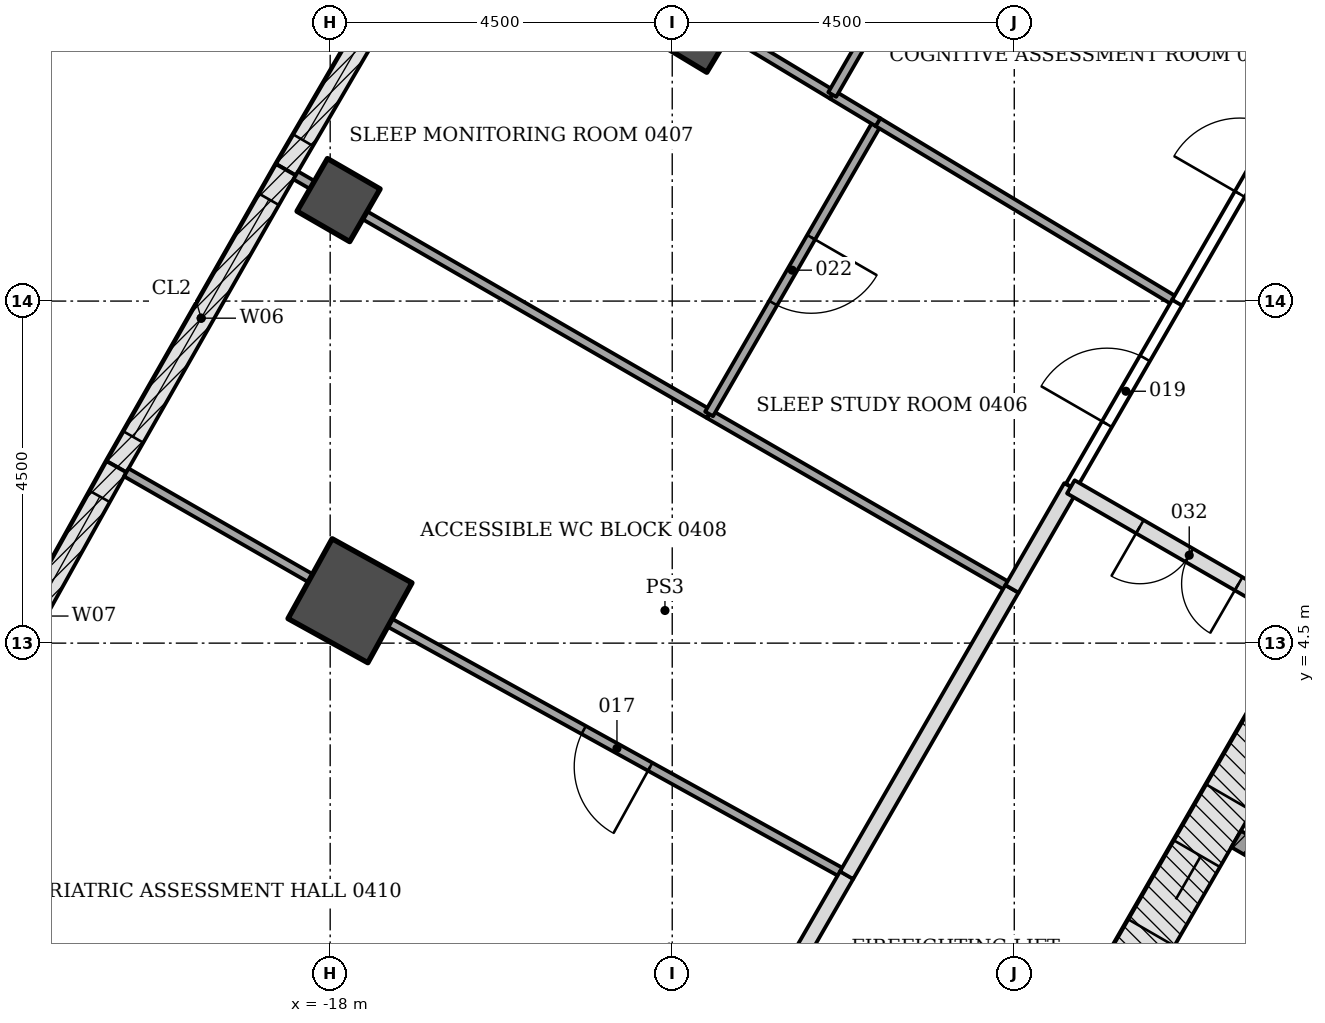
"""IFC4 building model, lengths in metres.
Left out: names, types, materials, properties, quantities, classifications, styles, units other than length and angle.
Written with IfcOpenShell. Run it as: python <this file> out.ifc"""

import sys

from ifc_helpers import new_model, si_unit, direction, frame, frame_2d, origin, origin_2d, place, context, subcontext, project, spatial, rectangle, extrude, element, fill, save


model = new_model("IFC4")
c1 = context("Model", 3, precision=1e-05, world=origin(), true_north=direction((0.0, 1.0)))
c2 = subcontext(c1, "Body", "Model", "MODEL_VIEW")
j1 = project(units=[si_unit("LENGTHUNIT", "METRE"), si_unit("PLANEANGLEUNIT", "RADIAN")], contexts=[c1])
p1 = place(None, origin())
s1 = spatial("IfcSite", under=j1, at=p1, CompositionType="ELEMENT")
p2 = place(p1, origin())
s2 = spatial("IfcBuilding", under=s1, at=p2, CompositionType="ELEMENT")
p3 = place(p2, frame((0.0, 0.0, 19.5)))
s3 = spatial("IfcBuildingStorey", under=s2, at=p3, CompositionType="ELEMENT", Elevation=19.5)
for number, where, z_axis, x_axis in (
    (1, (-13.25, 12.834, -0.25), (0.0, 0.0, 1.0), (-0.857, 0.516, 0.0)),
    (2, (-17.739, 5.058, -0.25), (0.0, 0.0, 1.0), (-0.875, 0.484, 0.0)),
):
    element("IfcColumn", number, at=place(p3, frame(where, z_axis=z_axis, x_axis=x_axis)), inside=s3, PredefinedType="COLUMN", context=c2, shape_type="SweptSolid", body=[
        extrude(rectangle(XDim=1.2, YDim=1.2, at=origin_2d()), origin(), (0.0, 0.0, 1.0), 4.55),
    ])
p4 = place(p3, frame((-17.89, 10.329, -0.25), z_axis=(0.0, 0.0, 1.0), x_axis=(-0.866025403784, 0.5, 0.0)))
e3 = element("IfcColumn", 3, at=p4, inside=s3, PredefinedType="COLUMN", context=c2, shape_type="SweptSolid", body=[
    extrude(rectangle(XDim=0.8, YDim=0.8, at=origin_2d()), origin(), (0.0, 0.0, 1.0), 4.55),
])
p5 = place(p3, frame((-1.083, 11.281, -0.25), z_axis=(0.0, 0.0, 1.0), x_axis=(-0.500001446645, -0.866024568562, 0.0)))
e4 = element("IfcWall", 4, at=p5, inside=s3, PredefinedType="SHEAR", context=c2, shape_type="SweptSolid", body=[
    extrude(rectangle(XDim=18.458, YDim=0.7, at=frame_2d((9.229, 0.0))), origin(), (0.0, 0.0, 1.0), 4.55),
])
p6 = place(p5, frame((8.979, 0.0, 0.25)))
e5 = element("IfcOpeningElement", 5, at=p6, cuts=e4, PredefinedType="OPENING", context=c2, shape_type="SweptSolid", body=[
    extrude(rectangle(XDim=1.2, YDim=2.1, at=frame_2d((0.6, 1.05))), frame((0.0, 0.36, 0.0), z_axis=(0.0, -1.0, 0.0), x_axis=(1.0, 0.0, 0.0)), (0.0, 0.0, 1.0), 0.72),
])
p7 = place(p5, frame((11.029, 0.0, 0.25)))
e6 = element("IfcOpeningElement", 6, at=p7, cuts=e4, PredefinedType="OPENING", context=c2, shape_type="SweptSolid", body=[
    extrude(rectangle(XDim=1.2, YDim=2.1, at=frame_2d((0.6, 1.05))), frame((0.0, 0.36, 0.0), z_axis=(0.0, -1.0, 0.0), x_axis=(1.0, 0.0, 0.0)), (0.0, 0.0, 1.0), 0.72),
])
p8 = place(p3, frame((-18.582, 10.73, 0.0), z_axis=(0.0, 0.0, 1.0), x_axis=(0.50445499627, 0.86343798662, 0.0)))
e7 = element("IfcWall", 7, at=p8, inside=s3, PredefinedType="NOTDEFINED", context=c2, shape_type="SweptSolid", body=[
    extrude(rectangle(XDim=4.496, YDim=0.3, at=frame_2d((2.248, 0.0))), origin(), (0.0, 0.0, 1.0), 4.3),
])
p9 = place(p8, frame((0.448, 0.0, 1.5)))
e8 = element("IfcOpeningElement", 8, at=p9, cuts=e7, PredefinedType="OPENING", context=c2, shape_type="SweptSolid", body=[
    extrude(rectangle(XDim=3.6, YDim=1.8, at=frame_2d((1.8, 0.9))), frame((0.0, 0.16, 0.0), z_axis=(0.0, -1.0, 0.0), x_axis=(1.0, 0.0, 0.0)), (0.0, 0.0, 1.0), 0.32),
])
p10 = place(p3, frame((-20.811, 6.823, 0.0), z_axis=(0.0, 0.0, 1.0), x_axis=(0.495524760411, 0.868593812907, 0.0)))
e9 = element("IfcWall", 9, at=p10, inside=s3, PredefinedType="NOTDEFINED", context=c2, shape_type="SweptSolid", body=[
    extrude(rectangle(XDim=4.496, YDim=0.3, at=frame_2d((2.248, 0.0))), origin(), (0.0, 0.0, 1.0), 4.3),
])
p11 = place(p10, frame((0.448, 0.0, 1.5)))
e10 = element("IfcOpeningElement", 10, at=p11, cuts=e9, PredefinedType="OPENING", context=c2, shape_type="SweptSolid", body=[
    extrude(rectangle(XDim=3.6, YDim=1.8, at=frame_2d((1.8, 0.9))), frame((0.0, 0.16, 0.0), z_axis=(0.0, -1.0, 0.0), x_axis=(1.0, 0.0, 0.0)), (0.0, 0.0, 1.0), 0.32),
])
p12 = place(p3, frame((-23.0, 2.893, 0.0), z_axis=(0.0, 0.0, 1.0), x_axis=(0.486606252415, 0.873621402617, 0.0)))
e11 = element("IfcWall", 11, at=p12, inside=s3, PredefinedType="NOTDEFINED", context=c2, shape_type="SweptSolid", body=[
    extrude(rectangle(XDim=4.496, YDim=0.3, at=frame_2d((2.248, 0.0))), origin(), (0.0, 0.0, 1.0), 4.3),
])
p13 = place(p12, frame((0.448, 0.0, 1.5)))
e12 = element("IfcOpeningElement", 12, at=p13, cuts=e11, PredefinedType="OPENING", context=c2, shape_type="SweptSolid", body=[
    extrude(rectangle(XDim=3.6, YDim=1.8, at=frame_2d((1.8, 0.9))), frame((0.0, 0.16, 0.0), z_axis=(0.0, -1.0, 0.0), x_axis=(1.0, 0.0, 0.0)), (0.0, 0.0, 1.0), 0.32),
])
p14 = place(p3, frame((-6.081, 1.923, -0.25), z_axis=(0.0, 0.0, 1.0), x_axis=(0.866032775405, -0.499987231761, 0.0)))
e13 = element("IfcWall", 13, at=p14, inside=s3, PredefinedType="PARTITIONING", context=c2, shape_type="SweptSolid", body=[
    extrude(rectangle(XDim=2.9, YDim=0.25, at=frame_2d((1.45, 0.0))), origin(), (0.0, 0.0, 1.0), 4.55),
])
p15 = place(p3, frame((-12.635, -1.028, 0.0), z_axis=(0.0, 0.0, 1.0), x_axis=(0.50005725472, 0.865992345233, 0.0)))
e14 = element("IfcWall", 14, at=p15, inside=s3, PredefinedType="PARTITIONING", context=c2, shape_type="SweptSolid", body=[
    extrude(rectangle(XDim=2.862, YDim=0.2, at=frame_2d((1.431, 0.0))), origin(), (0.0, 0.0, 1.0), 3.698),
])
p16 = place(p3, frame((-18.26, 5.356, 0.0), z_axis=(0.0, 0.0, 1.0), x_axis=(-0.867283853893, 0.49781393791, 0.0)))
e15 = element("IfcWall", 15, at=p16, inside=s3, PredefinedType="PARTITIONING", context=c2, shape_type="SweptSolid", body=[
    extrude(rectangle(XDim=2.792, YDim=0.12, at=frame_2d((1.396, 0.0))), origin(), (0.0, 0.0, 1.0), 3.683),
])
p17 = place(p3, frame((-11.208, 1.446, 0.0), z_axis=(0.0, 0.0, 1.0), x_axis=(-0.875125393946, 0.483896212912, 0.0)))
e16 = element("IfcWall", 16, at=p17, inside=s3, PredefinedType="PARTITIONING", context=c2, shape_type="SweptSolid", body=[
    extrude(rectangle(XDim=6.863, YDim=0.12, at=frame_2d((3.432, 0.0))), origin(), (0.0, 0.0, 1.0), 3.698),
])
p18 = place(p17, frame((2.95, 0.0, 0.0)))
e17 = element("IfcOpeningElement", 17, at=p18, cuts=e16, PredefinedType="OPENING", context=c2, shape_type="SweptSolid", body=[
    extrude(rectangle(XDim=1.0, YDim=2.1, at=frame_2d((0.5, 1.05))), frame((0.0, 0.07, 0.0), z_axis=(0.0, -1.0, 0.0), x_axis=(1.0, 0.0, 0.0)), (0.0, 0.0, 1.0), 0.14),
])
p19 = place(p3, frame((-9.031, 5.213, 0.0), z_axis=(0.0, 0.0, 1.0), x_axis=(-0.500044734646, -0.865999574684, 0.0)))
e18 = element("IfcWall", 18, at=p19, inside=s3, PredefinedType="PARTITIONING", context=c2, shape_type="SweptSolid", body=[
    extrude(rectangle(XDim=4.35, YDim=0.2, at=frame_2d((2.175, 0.0))), origin(), (0.0, 0.0, 1.0), 3.688),
])
p20 = place(p3, frame((-8.256, 6.555, 0.0), z_axis=(0.0, 0.0, 1.0), x_axis=(-0.499904469662, -0.866080551226, 0.0)))
e19 = element("IfcWall", 19, at=p20, inside=s3, PredefinedType="PARTITIONING", context=c2, shape_type="SweptSolid", body=[
    extrude(rectangle(XDim=1.548, YDim=0.2, at=frame_2d((0.774, 0.0))), origin(), (0.0, 0.0, 1.0), 3.688),
])
p21 = place(p3, frame((-5.226, 4.806, 0.0), z_axis=(0.0, 0.0, 1.0), x_axis=(-0.865949687125, 0.500131122175, 0.0)))
e20 = element("IfcWall", 20, at=p21, inside=s3, PredefinedType="PARTITIONING", context=c2, shape_type="SweptSolid", body=[
    extrude(rectangle(XDim=3.499, YDim=0.2, at=frame_2d((1.75, 0.0))), origin(), (0.0, 0.0, 1.0), 4.3),
])
p22 = place(p21, frame((0.95, 0.0, 0.0)))
e21 = element("IfcOpeningElement", 21, at=p22, cuts=e20, PredefinedType="OPENING", context=c2, shape_type="SweptSolid", body=[
    extrude(rectangle(XDim=1.5, YDim=2.1, at=frame_2d((0.75, 1.05))), frame((0.0, 0.11, 0.0), z_axis=(0.0, -1.0, 0.0), x_axis=(1.0, 0.0, 0.0)), (0.0, 0.0, 1.0), 0.22),
])
p23 = place(p3, frame((-9.032, 5.214, 0.0), z_axis=(0.0, 0.0, 1.0), x_axis=(-0.866038805516, 0.499976786802, 0.0)))
e22 = element("IfcWall", 22, at=p23, inside=s3, PredefinedType="PARTITIONING", context=c2, shape_type="SweptSolid", body=[
    extrude(rectangle(XDim=4.598, YDim=0.12, at=frame_2d((2.299, 0.0))), origin(), (0.0, 0.0, 1.0), 3.688),
])
p24 = place(p3, frame((-18.236, 10.528, 0.0), z_axis=(0.0, 0.0, 1.0), x_axis=(-0.864625231999, 0.50241736454, 0.0)))
e23 = element("IfcWall", 23, at=p24, inside=s3, PredefinedType="PARTITIONING", context=c2, shape_type="SweptSolid", body=[
    extrude(rectangle(XDim=0.251, YDim=0.12, at=frame_2d((0.125, 0.0))), origin(), (0.0, 0.0, 1.0), 4.3),
])
p25 = place(p3, frame((-13.017, 7.515, 0.0), z_axis=(0.0, 0.0, 1.0), x_axis=(-0.866023771128, 0.500002827834, 0.0)))
e24 = element("IfcWall", 24, at=p25, inside=s3, PredefinedType="PARTITIONING", context=c2, shape_type="SweptSolid", body=[
    extrude(rectangle(XDim=5.226, YDim=0.12, at=frame_2d((2.613, 0.0))), origin(), (0.0, 0.0, 1.0), 3.18),
])
p26 = place(p3, frame((-10.797, 11.355, 0.0), z_axis=(0.0, 0.0, 1.0), x_axis=(-0.500117989508, -0.865957271793, 0.0)))
e25 = element("IfcWall", 25, at=p26, inside=s3, PredefinedType="PARTITIONING", context=c2, shape_type="SweptSolid", body=[
    extrude(rectangle(XDim=4.435, YDim=0.12, at=frame_2d((2.217, 0.0))), origin(), (0.0, 0.0, 1.0), 3.688),
])
p27 = place(p26, frame((1.75, 0.0, 0.0)))
e26 = element("IfcOpeningElement", 26, at=p27, cuts=e25, PredefinedType="OPENING", context=c2, shape_type="SweptSolid", body=[
    extrude(rectangle(XDim=1.0, YDim=2.1, at=frame_2d((0.5, 1.05))), frame((0.0, 0.07, 0.0), z_axis=(0.0, -1.0, 0.0), x_axis=(1.0, 0.0, 0.0)), (0.0, 0.0, 1.0), 0.14),
])
p28 = place(p3, frame((-6.857, 8.983, 0.0), z_axis=(0.0, 0.0, 1.0), x_axis=(-0.856691171268, 0.515829658968, 0.0)))
e27 = element("IfcWall", 27, at=p28, inside=s3, PredefinedType="PARTITIONING", context=c2, shape_type="SweptSolid", body=[
    extrude(rectangle(XDim=4.6, YDim=0.12, at=frame_2d((2.3, 0.0))), origin(), (0.0, 0.0, 1.0), 3.698),
])
p29 = place(p3, frame((-8.256, 6.558, 0.0), z_axis=(0.0, 0.0, 1.0), x_axis=(0.500081734942, 0.86597820895, 0.0)))
e28 = element("IfcWall", 28, at=p29, inside=s3, PredefinedType="PARTITIONING", context=c2, shape_type="SweptSolid", body=[
    extrude(rectangle(XDim=2.804, YDim=0.15, at=frame_2d((1.402, 0.0))), origin(), (0.0, 0.0, 1.0), 3.698),
])
p30 = place(p29, frame((0.95, 0.0, 0.0)))
e29 = element("IfcOpeningElement", 29, at=p30, cuts=e28, PredefinedType="OPENING", context=c2, shape_type="SweptSolid", body=[
    extrude(rectangle(XDim=1.0, YDim=2.1, at=frame_2d((0.5, 1.05))), frame((0.0, 0.085, 0.0), z_axis=(0.0, -1.0, 0.0), x_axis=(1.0, 0.0, 0.0)), (0.0, 0.0, 1.0), 0.17),
])
p31 = place(p3, frame((-10.793, 11.353, 0.0), z_axis=(0.0, 0.0, 1.0), x_axis=(-0.856726860661, 0.515770381296, 0.0)))
e30 = element("IfcWall", 30, at=p31, inside=s3, PredefinedType="PARTITIONING", context=c2, shape_type="SweptSolid", body=[
    extrude(rectangle(XDim=0.704, YDim=0.12, at=frame_2d((0.352, 0.0))), origin(), (0.0, 0.0, 1.0), 3.698),
])
p32 = place(p3, frame((-11.397, 11.717, 0.0), z_axis=(0.0, 0.0, 1.0), x_axis=(-0.85652691333, 0.516102360721, 0.0)))
e31 = element("IfcWall", 31, at=p32, inside=s3, PredefinedType="PARTITIONING", context=c2, shape_type="SweptSolid", body=[
    extrude(rectangle(XDim=1.563, YDim=0.12, at=frame_2d((0.782, 0.0))), origin(), (0.0, 0.0, 1.0), 3.698),
])
p33 = place(p3, frame((-6.858, 8.979, 0.0), z_axis=(0.0, 0.0, 1.0), x_axis=(0.500105111742, 0.865964708986, 0.0)))
e32 = element("IfcWall", 32, at=p33, inside=s3, PredefinedType="PARTITIONING", context=c2, shape_type="SweptSolid", body=[
    extrude(rectangle(XDim=4.363, YDim=0.15, at=frame_2d((2.181, 0.0))), origin(), (0.0, 0.0, 1.0), 3.698),
])
p34 = place(p33, frame((1.65, 0.0, 0.0)))
e33 = element("IfcOpeningElement", 33, at=p34, cuts=e32, PredefinedType="OPENING", context=c2, shape_type="SweptSolid", body=[
    extrude(rectangle(XDim=1.0, YDim=2.1, at=frame_2d((0.5, 1.05))), frame((0.0, 0.085, 0.0), z_axis=(0.0, -1.0, 0.0), x_axis=(1.0, 0.0, 0.0)), (0.0, 0.0, 1.0), 0.17),
])
p35 = place(p3, frame((-9.17, 15.572, 0.0), z_axis=(0.0, 0.0, 1.0), x_axis=(-0.499902881486, -0.866081467924, 0.0)))
e34 = element("IfcWall", 34, at=p35, inside=s3, PredefinedType="PARTITIONING", context=c2, shape_type="SweptSolid", body=[
    extrude(rectangle(XDim=4.451, YDim=0.12, at=frame_2d((2.226, 0.0))), origin(), (0.0, 0.0, 1.0), 3.698),
])
p36 = place(p35, frame((1.75, 0.0, 0.0)))
e35 = element("IfcOpeningElement", 35, at=p36, cuts=e34, PredefinedType="OPENING", context=c2, shape_type="SweptSolid", body=[
    extrude(rectangle(XDim=1.0, YDim=2.1, at=frame_2d((0.5, 1.05))), frame((0.0, 0.07, 0.0), z_axis=(0.0, -1.0, 0.0), x_axis=(1.0, 0.0, 0.0)), (0.0, 0.0, 1.0), 0.14),
])
p37 = place(p9, origin())
e36 = element("IfcWindow", 36, at=p37, inside=s3, PartitioningType="SINGLE_PANEL", PredefinedType="WINDOW", context=c2, shape_type="SweptSolid", body=[
    extrude(rectangle(XDim=3.6, YDim=1.8, at=frame_2d((1.8, 0.9))), frame((0.0, 0.03, 0.0), z_axis=(0.0, -1.0, 0.0), x_axis=(1.0, 0.0, 0.0)), (0.0, 0.0, 1.0), 0.06),
])
fill(e8, e36)
p38 = place(p11, origin())
e37 = element("IfcWindow", 37, at=p38, inside=s3, PartitioningType="SINGLE_PANEL", PredefinedType="WINDOW", context=c2, shape_type="SweptSolid", body=[
    extrude(rectangle(XDim=3.6, YDim=1.8, at=frame_2d((1.8, 0.9))), frame((0.0, 0.03, 0.0), z_axis=(0.0, -1.0, 0.0), x_axis=(1.0, 0.0, 0.0)), (0.0, 0.0, 1.0), 0.06),
])
fill(e10, e37)
p39 = place(p13, origin())
e38 = element("IfcWindow", 38, at=p39, inside=s3, PartitioningType="SINGLE_PANEL", PredefinedType="WINDOW", context=c2, shape_type="SweptSolid", body=[
    extrude(rectangle(XDim=3.6, YDim=1.8, at=frame_2d((1.8, 0.9))), frame((0.0, 0.03, 0.0), z_axis=(0.0, -1.0, 0.0), x_axis=(1.0, 0.0, 0.0)), (0.0, 0.0, 1.0), 0.06),
])
fill(e12, e38)
p40 = place(p6, origin())
e39 = element("IfcDoor", 39, at=p40, inside=s3, OperationType="DOUBLE_DOOR_SLIDING", PredefinedType="DOOR", context=c2, shape_type="SweptSolid", body=[
    extrude(rectangle(XDim=1.2, YDim=2.1, at=frame_2d((0.6, 1.05))), frame((0.0, 0.025, 0.0), z_axis=(0.0, -1.0, 0.0), x_axis=(1.0, 0.0, 0.0)), (0.0, 0.0, 1.0), 0.05),
])
fill(e5, e39)
p41 = place(p7, origin())
e40 = element("IfcDoor", 40, at=p41, inside=s3, OperationType="DOUBLE_DOOR_SLIDING", PredefinedType="DOOR", context=c2, shape_type="SweptSolid", body=[
    extrude(rectangle(XDim=1.2, YDim=2.1, at=frame_2d((0.6, 1.05))), frame((0.0, 0.025, 0.0), z_axis=(0.0, -1.0, 0.0), x_axis=(1.0, 0.0, 0.0)), (0.0, 0.0, 1.0), 0.05),
])
fill(e6, e40)
p42 = place(p18, origin())
e41 = element("IfcDoor", 41, at=p42, inside=s3, OperationType="SINGLE_SWING_LEFT", PredefinedType="DOOR", context=c2, shape_type="SweptSolid", body=[
    extrude(rectangle(XDim=1.0, YDim=2.1, at=frame_2d((0.5, 1.05))), frame((0.0, 0.025, 0.0), z_axis=(0.0, -1.0, 0.0), x_axis=(1.0, 0.0, 0.0)), (0.0, 0.0, 1.0), 0.05),
])
fill(e17, e41)
p43 = place(p30, origin())
e42 = element("IfcDoor", 42, at=p43, inside=s3, OperationType="SINGLE_SWING_RIGHT", PredefinedType="DOOR", context=c2, shape_type="SweptSolid", body=[
    extrude(rectangle(XDim=1.0, YDim=2.1, at=frame_2d((0.5, 1.05))), frame((0.0, 0.025, 0.0), z_axis=(0.0, -1.0, 0.0), x_axis=(1.0, 0.0, 0.0)), (0.0, 0.0, 1.0), 0.05),
])
fill(e29, e42)
p44 = place(p27, origin())
e43 = element("IfcDoor", 43, at=p44, inside=s3, OperationType="SINGLE_SWING_LEFT", PredefinedType="DOOR", context=c2, shape_type="SweptSolid", body=[
    extrude(rectangle(XDim=1.0, YDim=2.1, at=frame_2d((0.5, 1.05))), frame((0.0, 0.025, 0.0), z_axis=(0.0, -1.0, 0.0), x_axis=(1.0, 0.0, 0.0)), (0.0, 0.0, 1.0), 0.05),
])
fill(e26, e43)
p45 = place(p34, origin())
e44 = element("IfcDoor", 44, at=p45, inside=s3, OperationType="SINGLE_SWING_LEFT", PredefinedType="DOOR", context=c2, shape_type="SweptSolid", body=[
    extrude(rectangle(XDim=1.0, YDim=2.1, at=frame_2d((0.5, 1.05))), frame((0.0, 0.025, 0.0), z_axis=(0.0, -1.0, 0.0), x_axis=(1.0, 0.0, 0.0)), (0.0, 0.0, 1.0), 0.05),
])
fill(e33, e44)
p46 = place(p22, origin())
e45 = element("IfcDoor", 45, at=p46, inside=s3, OperationType="DOUBLE_DOOR_SINGLE_SWING", PredefinedType="DOOR", context=c2, shape_type="SweptSolid", body=[
    extrude(rectangle(XDim=1.5, YDim=2.1, at=frame_2d((0.75, 1.05))), frame((0.0, 0.025, 0.0), z_axis=(0.0, -1.0, 0.0), x_axis=(1.0, 0.0, 0.0)), (0.0, 0.0, 1.0), 0.05),
])
fill(e21, e45)
save(model, sys.argv[1])
